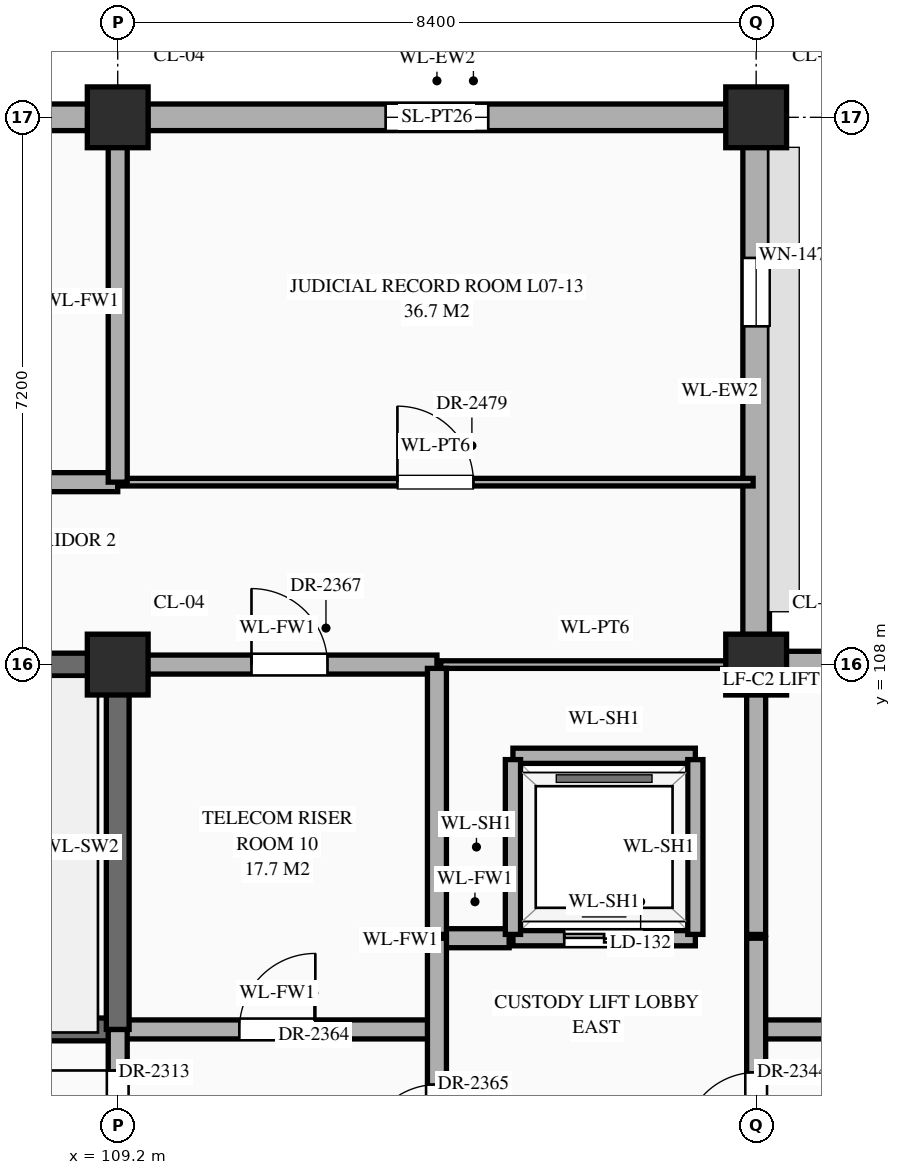
"""IFC4 building model, lengths in metres.
Left out: names, types, materials, properties, quantities, classifications, styles, units other than length and angle.
Written with IfcOpenShell. Run it as: python <this file> out.ifc"""

import sys

from ifc_helpers import new_model, si_unit, direction, frame, frame_2d, origin, origin_2d, place, context, subcontext, project, spatial, rectangle, extrude, element, fill, save


model = new_model("IFC4")
c1 = context("Model", 3, precision=1e-05, world=origin(), true_north=direction((0.0, 1.0)))
c2 = subcontext(c1, "Body", "Model", "MODEL_VIEW")
j1 = project(units=[si_unit("LENGTHUNIT", "METRE"), si_unit("PLANEANGLEUNIT", "RADIAN")], contexts=[c1])
p1 = place(None, origin())
s1 = spatial("IfcSite", under=j1, at=p1, CompositionType="ELEMENT")
p2 = place(p1, origin())
s2 = spatial("IfcBuilding", under=s1, at=p2, CompositionType="ELEMENT")
p3 = place(p2, frame((0.0, 0.0, 30.6)))
s3 = spatial("IfcBuildingStorey", under=s2, at=p3, CompositionType="ELEMENT", Elevation=30.6)
for number, where, z_axis, x_axis in (
    (1, (109.2, 108.0, 0.0), (0.0, 0.0, 1.0), (1.0, 0.0, 0.0)),
    (2, (109.2, 115.2, 0.0), (0.0, 0.0, 1.0), (1.0, 0.0, 0.0)),
    (3, (117.6, 108.0, 0.0), (0.0, 0.0, 1.0), (1.0, 0.0, 0.0)),
    (4, (117.6, 115.2, 0.0), (0.0, 0.0, 1.0), (1.0, 0.0, 0.0)),
):
    element("IfcColumn", number, at=place(p3, frame(where, z_axis=z_axis, x_axis=x_axis)), inside=s3, PredefinedType="COLUMN", context=c2, shape_type="SweptSolid", body=[
        extrude(rectangle(XDim=0.8, YDim=0.8, at=origin_2d()), origin(), (0.0, 0.0, 1.0), 4.5),
    ])
p4 = place(p3, frame((101.195, 115.2, 0.0), z_axis=(0.0, 0.0, 1.0), x_axis=(1.0, 0.0, 0.0)))
e5 = element("IfcWall", 5, at=p4, inside=s3, PredefinedType="STANDARD", context=c2, shape_type="SweptSolid", body=[
    extrude(rectangle(XDim=7.61, YDim=0.35, at=frame_2d((3.805, 0.0))), origin(), (0.0, 0.0, 1.0), 3.59),
])
p5 = place(p3, frame((109.595, 115.2, 0.0), z_axis=(0.0, 0.0, 1.0), x_axis=(1.0, 0.0, 0.0)))
e6 = element("IfcWall", 6, at=p5, inside=s3, PredefinedType="STANDARD", context=c2, shape_type="SweptSolid", body=[
    extrude(rectangle(XDim=7.61, YDim=0.35, at=frame_2d((3.805, 0.0))), origin(), (0.0, 0.0, 1.0), 3.59),
])
p6 = place(p5, frame((3.13, 0.0, 0.85)))
e7 = element("IfcOpeningElement", 7, at=p6, cuts=e6, PredefinedType="OPENING", context=c2, shape_type="SweptSolid", body=[
    extrude(rectangle(XDim=1.35, YDim=1.38, at=frame_2d((0.675, 0.69))), frame((0.0, 0.187, 0.0), z_axis=(0.0, -1.0, 0.0), x_axis=(1.0, 0.0, 0.0)), (0.0, 0.0, 1.0), 0.374),
])
p7 = place(p3, frame((117.6, 108.395, 0.0), z_axis=(0.0, 0.0, 1.0), x_axis=(0.0, 1.0, 0.0)))
e8 = element("IfcWall", 8, at=p7, inside=s3, PredefinedType="STANDARD", context=c2, shape_type="SweptSolid", body=[
    extrude(rectangle(XDim=6.41, YDim=0.35, at=frame_2d((3.205, 0.0))), origin(), (0.0, 0.0, 1.0), 3.59),
])
p8 = place(p7, frame((4.055, 0.0, 0.85)))
e9 = element("IfcOpeningElement", 9, at=p8, cuts=e8, PredefinedType="OPENING", context=c2, shape_type="SweptSolid", body=[
    extrude(rectangle(XDim=0.9, YDim=1.92, at=frame_2d((0.45, 0.96))), frame((0.0, 0.187, 0.0), z_axis=(0.0, -1.0, 0.0), x_axis=(1.0, 0.0, 0.0)), (0.0, 0.0, 1.0), 0.374),
])
p9 = place(p3, frame((117.995, 108.0, 0.0), z_axis=(0.0, 0.0, 1.0), x_axis=(1.0, 0.0, 0.0)))
e10 = element("IfcWall", 10, at=p9, inside=s3, PredefinedType="STANDARD", context=c2, shape_type="SweptSolid", body=[
    extrude(rectangle(XDim=7.61, YDim=0.35, at=frame_2d((3.805, 0.0))), origin(), (0.0, 0.0, 1.0), 3.59),
])
p10 = place(p3, frame((100.8, 103.2, 0.0), z_axis=(0.0, 0.0, 1.0), x_axis=(1.0, 0.0, 0.0)))
e11 = element("IfcWall", 11, at=p10, inside=s3, PredefinedType="SHEAR", context=c2, shape_type="SweptSolid", body=[
    extrude(rectangle(XDim=8.4, YDim=0.3, at=frame_2d((4.2, 0.0))), origin(), (0.0, 0.0, 1.0), 4.24),
])
p11 = place(p10, frame((0.65, 0.0, 0.0)))
e12 = element("IfcOpeningElement", 12, at=p11, cuts=e11, PredefinedType="OPENING", context=c2, shape_type="SweptSolid", body=[
    extrude(rectangle(XDim=1.1, YDim=2.2, at=frame_2d((0.55, 1.1))), frame((0.0, 0.162, 0.0), z_axis=(0.0, -1.0, 0.0), x_axis=(1.0, 0.0, 0.0)), (0.0, 0.0, 1.0), 0.324),
])
p12 = place(p3, frame((109.2, 103.2, 0.0), z_axis=(0.0, 0.0, 1.0), x_axis=(1.0, 0.0, 0.0)))
e13 = element("IfcWall", 13, at=p12, inside=s3, PredefinedType="STANDARD", context=c2, shape_type="SweptSolid", body=[
    extrude(rectangle(XDim=4.2, YDim=0.25, at=frame_2d((2.1, 0.0))), origin(), (0.0, 0.0, 1.0), 4.24),
])
p13 = place(p12, frame((1.6, 0.0, 0.0)))
e14 = element("IfcOpeningElement", 14, at=p13, cuts=e13, PredefinedType="OPENING", context=c2, shape_type="SweptSolid", body=[
    extrude(rectangle(XDim=1.0, YDim=2.2, at=frame_2d((0.5, 1.1))), frame((0.0, 0.137, 0.0), z_axis=(0.0, -1.0, 0.0), x_axis=(1.0, 0.0, 0.0)), (0.0, 0.0, 1.0), 0.274),
])
p14 = place(p3, frame((117.6, 103.2, 0.0), z_axis=(0.0, 0.0, 1.0), x_axis=(1.0, 0.0, 0.0)))
e15 = element("IfcWall", 15, at=p14, inside=s3, PredefinedType="STANDARD", context=c2, shape_type="SweptSolid", body=[
    extrude(rectangle(XDim=4.2, YDim=0.25, at=frame_2d((2.1, 0.0))), origin(), (0.0, 0.0, 1.0), 4.24),
])
p15 = place(p14, frame((1.55, 0.0, 0.0)))
e16 = element("IfcOpeningElement", 16, at=p15, cuts=e15, PredefinedType="OPENING", context=c2, shape_type="SweptSolid", body=[
    extrude(rectangle(XDim=1.1, YDim=2.2, at=frame_2d((0.55, 1.1))), frame((0.0, 0.137, 0.0), z_axis=(0.0, -1.0, 0.0), x_axis=(1.0, 0.0, 0.0)), (0.0, 0.0, 1.0), 0.274),
])
p16 = place(p3, frame((113.45, 104.4, 0.0), z_axis=(0.0, 0.0, 1.0), x_axis=(1.0, 0.0, 0.0)))
e17 = element("IfcWall", 17, at=p16, inside=s3, PredefinedType="STANDARD", context=c2, shape_type="SweptSolid", body=[
    extrude(rectangle(XDim=0.9, YDim=0.25, at=frame_2d((0.45, 0.0))), origin(), (0.0, 0.0, 1.0), 4.24),
])
p17 = place(p3, frame((114.4, 104.4, 0.0), z_axis=(0.0, 0.0, 1.0), x_axis=(1.0, 0.0, 0.0)))
e18 = element("IfcWall", 18, at=p17, inside=s3, PredefinedType="STANDARD", context=c2, shape_type="SweptSolid", body=[
    extrude(rectangle(XDim=2.4, YDim=0.2, at=frame_2d((1.2, 0.0))), origin(), (0.0, 0.0, 1.0), 4.24),
])
p18 = place(p17, frame((0.675, 0.0, 0.0)))
e19 = element("IfcOpeningElement", 19, at=p18, cuts=e18, PredefinedType="OPENING", context=c2, shape_type="SweptSolid", body=[
    extrude(rectangle(XDim=1.05, YDim=2.15, at=frame_2d((0.525, 1.075))), frame((0.0, 0.112, 0.0), z_axis=(0.0, -1.0, 0.0), x_axis=(1.0, 0.0, 0.0)), (0.0, 0.0, 1.0), 0.224),
])
p19 = place(p3, frame((114.4, 106.8, 0.0), z_axis=(0.0, 0.0, 1.0), x_axis=(1.0, 0.0, 0.0)))
e20 = element("IfcWall", 20, at=p19, inside=s3, PredefinedType="STANDARD", context=c2, shape_type="SweptSolid", body=[
    extrude(rectangle(XDim=2.4, YDim=0.2, at=frame_2d((1.2, 0.0))), origin(), (0.0, 0.0, 1.0), 4.24),
])
p20 = place(p3, frame((100.8, 108.0, 0.0), z_axis=(0.0, 0.0, 1.0), x_axis=(1.0, 0.0, 0.0)))
e21 = element("IfcWall", 21, at=p20, inside=s3, PredefinedType="SHEAR", context=c2, shape_type="SweptSolid", body=[
    extrude(rectangle(XDim=8.4, YDim=0.3, at=frame_2d((4.2, 0.0))), origin(), (0.0, 0.0, 1.0), 4.24),
])
p21 = place(p3, frame((109.2, 108.0, 0.0), z_axis=(0.0, 0.0, 1.0), x_axis=(1.0, 0.0, 0.0)))
e22 = element("IfcWall", 22, at=p21, inside=s3, PredefinedType="STANDARD", context=c2, shape_type="SweptSolid", body=[
    extrude(rectangle(XDim=4.2, YDim=0.25, at=frame_2d((2.1, 0.0))), origin(), (0.0, 0.0, 1.0), 3.39),
])
p22 = place(p21, frame((1.76, 0.0, 0.0)))
e23 = element("IfcOpeningElement", 23, at=p22, cuts=e22, PredefinedType="OPENING", context=c2, shape_type="SweptSolid", body=[
    extrude(rectangle(XDim=1.0, YDim=2.2, at=frame_2d((0.5, 1.1))), frame((0.0, 0.137, 0.0), z_axis=(0.0, -1.0, 0.0), x_axis=(1.0, 0.0, 0.0)), (0.0, 0.0, 1.0), 0.274),
])
p23 = place(p3, frame((113.45, 108.0, 0.0), z_axis=(0.0, 0.0, 1.0), x_axis=(1.0, 0.0, 0.0)))
e24 = element("IfcWall", 24, at=p23, inside=s3, PredefinedType="STANDARD", context=c2, shape_type="SweptSolid", body=[
    extrude(rectangle(XDim=4.06, YDim=0.1, at=frame_2d((2.03, 0.0))), origin(), (0.0, 0.0, 1.0), 3.39),
])
p24 = place(p3, frame((100.8, 110.4, 0.0), z_axis=(0.0, 0.0, 1.0), x_axis=(1.0, 0.0, 0.0)))
e25 = element("IfcWall", 25, at=p24, inside=s3, PredefinedType="STANDARD", context=c2, shape_type="SweptSolid", body=[
    extrude(rectangle(XDim=8.4, YDim=0.25, at=frame_2d((4.2, 0.0))), origin(), (0.0, 0.0, 1.0), 4.24),
])
p25 = place(p24, frame((3.7, 0.0, 0.0)))
e26 = element("IfcOpeningElement", 26, at=p25, cuts=e25, PredefinedType="OPENING", context=c2, shape_type="SweptSolid", body=[
    extrude(rectangle(XDim=1.0, YDim=2.2, at=frame_2d((0.5, 1.1))), frame((0.0, 0.137, 0.0), z_axis=(0.0, -1.0, 0.0), x_axis=(1.0, 0.0, 0.0)), (0.0, 0.0, 1.0), 0.274),
])
p26 = place(p3, frame((109.2, 110.4, 0.0), z_axis=(0.0, 0.0, 1.0), x_axis=(1.0, 0.0, 0.0)))
e27 = element("IfcWall", 27, at=p26, inside=s3, PredefinedType="STANDARD", context=c2, shape_type="SweptSolid", body=[
    extrude(rectangle(XDim=8.36, YDim=0.1, at=frame_2d((4.18, 0.0))), origin(), (0.0, 0.0, 1.0), 4.24),
])
p27 = place(p26, frame((3.68, 0.0, 0.0)))
e28 = element("IfcOpeningElement", 28, at=p27, cuts=e27, PredefinedType="OPENING", context=c2, shape_type="SweptSolid", body=[
    extrude(rectangle(XDim=1.0, YDim=2.25, at=frame_2d((0.5, 1.125))), frame((0.0, 0.062, 0.0), z_axis=(0.0, -1.0, 0.0), x_axis=(1.0, 0.0, 0.0)), (0.0, 0.0, 1.0), 0.124),
])
p28 = place(p3, frame((109.2, 100.8, 0.0), z_axis=(0.0, 0.0, 1.0), x_axis=(0.0, 1.0, 0.0)))
e29 = element("IfcWall", 29, at=p28, inside=s3, PredefinedType="STANDARD", context=c2, shape_type="SweptSolid", body=[
    extrude(rectangle(XDim=2.4, YDim=0.25, at=frame_2d((1.2, 0.0))), origin(), (0.0, 0.0, 1.0), 3.49),
])
p29 = place(p28, frame((0.86, 0.0, 0.0)))
e30 = element("IfcOpeningElement", 30, at=p29, cuts=e29, PredefinedType="OPENING", context=c2, shape_type="SweptSolid", body=[
    extrude(rectangle(XDim=1.0, YDim=2.2, at=frame_2d((0.5, 1.1))), frame((0.0, 0.137, 0.0), z_axis=(0.0, -1.0, 0.0), x_axis=(1.0, 0.0, 0.0)), (0.0, 0.0, 1.0), 0.274),
])
p30 = place(p3, frame((109.2, 103.2, 0.0), z_axis=(0.0, 0.0, 1.0), x_axis=(0.0, 1.0, 0.0)))
e31 = element("IfcWall", 31, at=p30, inside=s3, PredefinedType="SHEAR", context=c2, shape_type="SweptSolid", body=[
    extrude(rectangle(XDim=4.8, YDim=0.3, at=frame_2d((2.4, 0.0))), origin(), (0.0, 0.0, 1.0), 4.24),
])
p31 = place(p3, frame((109.2, 110.4, 0.0), z_axis=(0.0, 0.0, 1.0), x_axis=(0.0, 1.0, 0.0)))
e32 = element("IfcWall", 32, at=p31, inside=s3, PredefinedType="STANDARD", context=c2, shape_type="SweptSolid", body=[
    extrude(rectangle(XDim=4.76, YDim=0.25, at=frame_2d((2.38, 0.0))), origin(), (0.0, 0.0, 1.0), 3.49),
])
p32 = place(p3, frame((113.4, 100.8, 0.0), z_axis=(0.0, 0.0, 1.0), x_axis=(0.0, 1.0, 0.0)))
e33 = element("IfcWall", 33, at=p32, inside=s3, PredefinedType="STANDARD", context=c2, shape_type="SweptSolid", body=[
    extrude(rectangle(XDim=3.6, YDim=0.25, at=frame_2d((1.8, 0.0))), origin(), (0.0, 0.0, 1.0), 3.84),
])
p33 = place(p32, frame((0.725, 0.0, 0.0)))
e34 = element("IfcOpeningElement", 34, at=p33, cuts=e33, PredefinedType="OPENING", context=c2, shape_type="SweptSolid", body=[
    extrude(rectangle(XDim=0.95, YDim=2.15, at=frame_2d((0.475, 1.075))), frame((0.0, 0.137, 0.0), z_axis=(0.0, -1.0, 0.0), x_axis=(1.0, 0.0, 0.0)), (0.0, 0.0, 1.0), 0.274),
])
p34 = place(p3, frame((113.4, 104.45, 0.0), z_axis=(0.0, 0.0, 1.0), x_axis=(0.0, 1.0, 0.0)))
e35 = element("IfcWall", 35, at=p34, inside=s3, PredefinedType="STANDARD", context=c2, shape_type="SweptSolid", body=[
    extrude(rectangle(XDim=3.5, YDim=0.25, at=frame_2d((1.75, 0.0))), origin(), (0.0, 0.0, 1.0), 3.84),
])
for number, where, z_axis, x_axis in (
    (36, (114.4, 104.45, 0.0), (0.0, 0.0, 1.0), (0.0, 1.0, 0.0)),
    (37, (116.8, 104.45, 0.0), (0.0, 0.0, 1.0), (0.0, 1.0, 0.0)),
):
    element("IfcWall", number, at=place(p3, frame(where, z_axis=z_axis, x_axis=x_axis)), inside=s3, PredefinedType="STANDARD", context=c2, shape_type="SweptSolid", body=[
        extrude(rectangle(XDim=2.3, YDim=0.2, at=frame_2d((1.15, 0.0))), origin(), (0.0, 0.0, 1.0), 4.24),
    ])
p35 = place(p3, frame((117.6, 91.2, 0.0), z_axis=(0.0, 0.0, 1.0), x_axis=(0.0, 1.0, 0.0)))
e38 = element("IfcWall", 38, at=p35, inside=s3, PredefinedType="STANDARD", context=c2, shape_type="SweptSolid", body=[
    extrude(rectangle(XDim=13.2, YDim=0.25, at=frame_2d((6.6, 0.0))), origin(), (0.0, 0.0, 1.0), 3.49),
])
p36 = place(p35, frame((0.54, 0.0, 0.0)))
e39 = element("IfcOpeningElement", 39, at=p36, cuts=e38, PredefinedType="OPENING", context=c2, shape_type="SweptSolid", body=[
    extrude(rectangle(XDim=1.0, YDim=2.2, at=frame_2d((0.5, 1.1))), frame((0.0, 0.137, 0.0), z_axis=(0.0, -1.0, 0.0), x_axis=(1.0, 0.0, 0.0)), (0.0, 0.0, 1.0), 0.274),
])
p37 = place(p35, frame((10.485, 0.0, 0.0)))
e40 = element("IfcOpeningElement", 40, at=p37, cuts=e38, PredefinedType="OPENING", context=c2, shape_type="SweptSolid", body=[
    extrude(rectangle(XDim=0.95, YDim=2.15, at=frame_2d((0.475, 1.075))), frame((0.0, 0.137, 0.0), z_axis=(0.0, -1.0, 0.0), x_axis=(1.0, 0.0, 0.0)), (0.0, 0.0, 1.0), 0.274),
])
p38 = place(p35, frame((3.285, 0.0, 0.0)))
e41 = element("IfcOpeningElement", 41, at=p38, cuts=e38, PredefinedType="OPENING", context=c2, shape_type="SweptSolid", body=[
    extrude(rectangle(XDim=0.95, YDim=2.15, at=frame_2d((0.475, 1.075))), frame((0.0, 0.137, 0.0), z_axis=(0.0, -1.0, 0.0), x_axis=(1.0, 0.0, 0.0)), (0.0, 0.0, 1.0), 0.274),
])
p39 = place(p3, frame((117.6, 104.45, 0.0), z_axis=(0.0, 0.0, 1.0), x_axis=(0.0, 1.0, 0.0)))
e42 = element("IfcWall", 42, at=p39, inside=s3, PredefinedType="STANDARD", context=c2, shape_type="SweptSolid", body=[
    extrude(rectangle(XDim=3.46, YDim=0.25, at=frame_2d((1.73, 0.0))), origin(), (0.0, 0.0, 1.0), 3.49),
])
p40 = place(p6, origin())
e43 = element("IfcWindow", 43, at=p40, inside=s3, PartitioningType="SINGLE_PANEL", PredefinedType="WINDOW", context=c2, shape_type="SweptSolid", body=[
    extrude(rectangle(XDim=1.35, YDim=1.38, at=frame_2d((0.675, 0.69))), frame((0.0, 0.03, 0.0), z_axis=(0.0, -1.0, 0.0), x_axis=(1.0, 0.0, 0.0)), (0.0, 0.0, 1.0), 0.06),
])
fill(e7, e43)
p41 = place(p8, origin())
e44 = element("IfcWindow", 44, at=p41, inside=s3, PartitioningType="SINGLE_PANEL", PredefinedType="WINDOW", context=c2, shape_type="SweptSolid", body=[
    extrude(rectangle(XDim=0.9, YDim=1.92, at=frame_2d((0.45, 0.96))), frame((0.0, 0.03, 0.0), z_axis=(0.0, -1.0, 0.0), x_axis=(1.0, 0.0, 0.0)), (0.0, 0.0, 1.0), 0.06),
])
fill(e9, e44)
p42 = place(p18, origin())
e45 = element("IfcDoor", 45, at=p42, inside=s3, OperationType="DOUBLE_DOOR_SLIDING", PredefinedType="DOOR", context=c2, shape_type="SweptSolid", body=[
    extrude(rectangle(XDim=1.05, YDim=2.15, at=frame_2d((0.525, 1.075))), frame((0.0, 0.025, 0.0), z_axis=(0.0, -1.0, 0.0), x_axis=(1.0, 0.0, 0.0)), (0.0, 0.0, 1.0), 0.05),
])
fill(e19, e45)
p43 = place(p29, origin())
e46 = element("IfcDoor", 46, at=p43, inside=s3, OperationType="SINGLE_SWING_RIGHT", PredefinedType="DOOR", context=c2, shape_type="SweptSolid", body=[
    extrude(rectangle(XDim=1.0, YDim=2.2, at=frame_2d((0.5, 1.1))), frame((0.0, 0.025, 0.0), z_axis=(0.0, -1.0, 0.0), x_axis=(1.0, 0.0, 0.0)), (0.0, 0.0, 1.0), 0.05),
])
fill(e30, e46)
p44 = place(p37, origin())
e47 = element("IfcDoor", 47, at=p44, inside=s3, OperationType="SINGLE_SWING_LEFT", PredefinedType="DOOR", context=c2, shape_type="SweptSolid", body=[
    extrude(rectangle(XDim=0.95, YDim=2.15, at=frame_2d((0.475, 1.075))), frame((0.0, 0.025, 0.0), z_axis=(0.0, -1.0, 0.0), x_axis=(1.0, 0.0, 0.0)), (0.0, 0.0, 1.0), 0.05),
])
fill(e40, e47)
p45 = place(p13, origin())
e48 = element("IfcDoor", 48, at=p45, inside=s3, OperationType="SINGLE_SWING_RIGHT", PredefinedType="DOOR", context=c2, shape_type="SweptSolid", body=[
    extrude(rectangle(XDim=1.0, YDim=2.2, at=frame_2d((0.5, 1.1))), frame((0.0, 0.025, 0.0), z_axis=(0.0, -1.0, 0.0), x_axis=(1.0, 0.0, 0.0)), (0.0, 0.0, 1.0), 0.05),
])
fill(e14, e48)
p46 = place(p33, origin())
e49 = element("IfcDoor", 49, at=p46, inside=s3, OperationType="SINGLE_SWING_LEFT", PredefinedType="DOOR", context=c2, shape_type="SweptSolid", body=[
    extrude(rectangle(XDim=0.95, YDim=2.15, at=frame_2d((0.475, 1.075))), frame((0.0, 0.025, 0.0), z_axis=(0.0, -1.0, 0.0), x_axis=(1.0, 0.0, 0.0)), (0.0, 0.0, 1.0), 0.05),
])
fill(e34, e49)
p47 = place(p22, origin())
e50 = element("IfcDoor", 50, at=p47, inside=s3, OperationType="SINGLE_SWING_LEFT", PredefinedType="DOOR", context=c2, shape_type="SweptSolid", body=[
    extrude(rectangle(XDim=1.0, YDim=2.2, at=frame_2d((0.5, 1.1))), frame((0.0, 0.025, 0.0), z_axis=(0.0, -1.0, 0.0), x_axis=(1.0, 0.0, 0.0)), (0.0, 0.0, 1.0), 0.05),
])
fill(e23, e50)
p48 = place(p27, origin())
e51 = element("IfcDoor", 51, at=p48, inside=s3, OperationType="SINGLE_SWING_LEFT", PredefinedType="DOOR", context=c2, shape_type="SweptSolid", body=[
    extrude(rectangle(XDim=1.0, YDim=2.25, at=frame_2d((0.5, 1.125))), frame((0.0, 0.025, 0.0), z_axis=(0.0, -1.0, 0.0), x_axis=(1.0, 0.0, 0.0)), (0.0, 0.0, 1.0), 0.05),
])
fill(e28, e51)
save(model, sys.argv[1])
